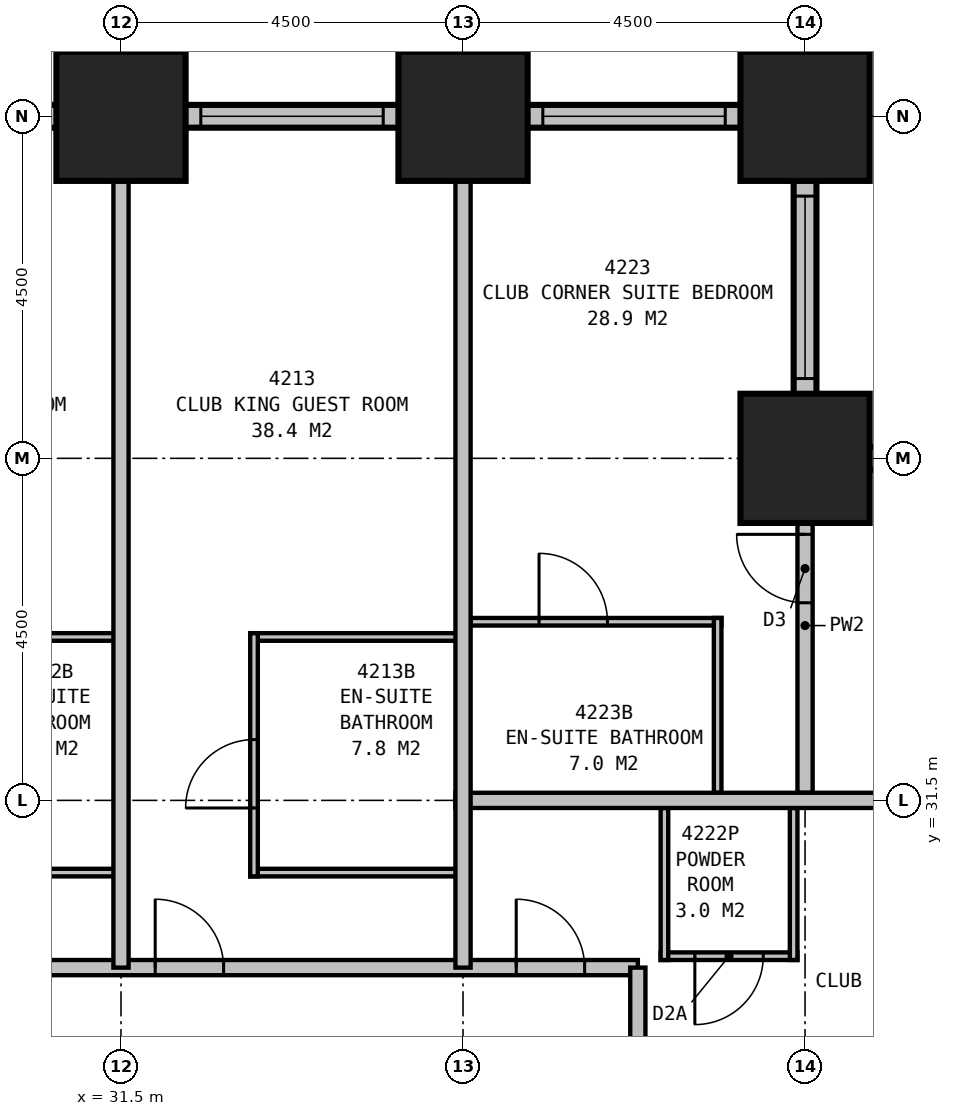
"""IFC4 building model, lengths in metres.
Left out: names, types, materials, properties, quantities, classifications, styles, units other than length and angle.
Written with IfcOpenShell. Run it as: python <this file> out.ifc"""

import sys

from ifc_helpers import new_model, si_unit, direction, frame, frame_2d, origin, origin_2d, place, context, subcontext, project, spatial, rectangle, extrude, element, fill, save


model = new_model("IFC4")
c1 = context("Model", 3, precision=1e-05, world=origin(), true_north=direction((0.0, 1.0)))
c2 = subcontext(c1, "Body", "Model", "MODEL_VIEW")
j1 = project(units=[si_unit("LENGTHUNIT", "METRE"), si_unit("PLANEANGLEUNIT", "RADIAN")], contexts=[c1])
p1 = place(None, origin())
s1 = spatial("IfcSite", under=j1, at=p1, CompositionType="ELEMENT")
p2 = place(p1, origin())
s2 = spatial("IfcBuilding", under=s1, at=p2, CompositionType="ELEMENT")
p3 = place(p2, frame((0.0, 0.0, 165.9)))
s3 = spatial("IfcBuildingStorey", under=s2, at=p3, CompositionType="ELEMENT", Elevation=165.9)
for number, where, z_axis, x_axis in (
    (1, (40.5, 36.0, 0.0), (0.0, 0.0, 1.0), (1.0, 0.0, 0.0)),
    (2, (40.5, 40.5, 0.0), (0.0, 0.0, 1.0), (1.0, 0.0, 0.0)),
    (3, (36.0, 40.5, 0.0), (0.0, 0.0, 1.0), (1.0, 0.0, 0.0)),
    (4, (31.5, 40.5, 0.0), (0.0, 0.0, 1.0), (1.0, 0.0, 0.0)),
):
    element("IfcColumn", number, at=place(p3, frame(where, z_axis=z_axis, x_axis=x_axis)), inside=s3, PredefinedType="COLUMN", context=c2, shape_type="SweptSolid", body=[
        extrude(rectangle(XDim=1.7, YDim=1.7, at=origin_2d()), origin(), (0.0, 0.0, 1.0), 3.5),
    ])
p4 = place(p3, frame((45.65, 36.0, 0.0), z_axis=(0.0, 0.0, 1.0), x_axis=(-1.0, 0.0, 0.0)))
e5 = element("IfcWall", 5, at=p4, inside=s3, PredefinedType="STANDARD", context=c2, shape_type="SweptSolid", body=[
    extrude(rectangle(XDim=5.3, YDim=0.3, at=frame_2d((2.65, 0.0))), origin(), (0.0, 0.0, 1.0), 2.25),
])
p5 = place(p4, frame((1.45, 0.0, 0.5)))
e6 = element("IfcOpeningElement", 6, at=p5, cuts=e5, PredefinedType="OPENING", context=c2, shape_type="SweptSolid", body=[
    extrude(rectangle(XDim=2.4, YDim=1.6, at=frame_2d((1.2, 0.8))), frame((0.0, 0.16, 0.0), z_axis=(0.0, -1.0, 0.0), x_axis=(1.0, 0.0, 0.0)), (0.0, 0.0, 1.0), 0.32),
])
p6 = place(p3, frame((40.5, 35.85, 0.0), z_axis=(0.0, 0.0, 1.0), x_axis=(0.0, 1.0, 0.0)))
e7 = element("IfcWall", 7, at=p6, inside=s3, PredefinedType="STANDARD", context=c2, shape_type="SweptSolid", body=[
    extrude(rectangle(XDim=4.8, YDim=0.3, at=frame_2d((2.4, 0.0))), origin(), (0.0, 0.0, 1.0), 2.25),
])
p7 = place(p6, frame((1.2, 0.0, 0.5)))
e8 = element("IfcOpeningElement", 8, at=p7, cuts=e7, PredefinedType="OPENING", context=c2, shape_type="SweptSolid", body=[
    extrude(rectangle(XDim=2.4, YDim=1.6, at=frame_2d((1.2, 0.8))), frame((0.0, 0.16, 0.0), z_axis=(0.0, -1.0, 0.0), x_axis=(1.0, 0.0, 0.0)), (0.0, 0.0, 1.0), 0.32),
])
p8 = place(p3, frame((40.65, 40.5, 0.0), z_axis=(0.0, 0.0, 1.0), x_axis=(-1.0, 0.0, 0.0)))
e9 = element("IfcWall", 9, at=p8, inside=s3, PredefinedType="STANDARD", context=c2, shape_type="SweptSolid", body=[
    extrude(rectangle(XDim=31.8, YDim=0.3, at=frame_2d((15.9, 0.0))), origin(), (0.0, 0.0, 1.0), 2.25),
])
p9 = place(p8, frame((1.2, 0.0, 0.5)))
e10 = element("IfcOpeningElement", 10, at=p9, cuts=e9, PredefinedType="OPENING", context=c2, shape_type="SweptSolid", body=[
    extrude(rectangle(XDim=2.4, YDim=1.6, at=frame_2d((1.2, 0.8))), frame((0.0, 0.16, 0.0), z_axis=(0.0, -1.0, 0.0), x_axis=(1.0, 0.0, 0.0)), (0.0, 0.0, 1.0), 0.32),
])
p10 = place(p8, frame((5.7, 0.0, 0.5)))
e11 = element("IfcOpeningElement", 11, at=p10, cuts=e9, PredefinedType="OPENING", context=c2, shape_type="SweptSolid", body=[
    extrude(rectangle(XDim=2.4, YDim=1.6, at=frame_2d((1.2, 0.8))), frame((0.0, 0.16, 0.0), z_axis=(0.0, -1.0, 0.0), x_axis=(1.0, 0.0, 0.0)), (0.0, 0.0, 1.0), 0.32),
])
p11 = place(p8, frame((10.2, 0.0, 0.5)))
e12 = element("IfcOpeningElement", 12, at=p11, cuts=e9, PredefinedType="OPENING", context=c2, shape_type="SweptSolid", body=[
    extrude(rectangle(XDim=2.4, YDim=1.6, at=frame_2d((1.2, 0.8))), frame((0.0, 0.16, 0.0), z_axis=(0.0, -1.0, 0.0), x_axis=(1.0, 0.0, 0.0)), (0.0, 0.0, 1.0), 0.32),
])
p12 = place(p8, frame((14.7, 0.0, 0.5)))
e13 = element("IfcOpeningElement", 13, at=p12, cuts=e9, PredefinedType="OPENING", context=c2, shape_type="SweptSolid", body=[
    extrude(rectangle(XDim=2.4, YDim=1.6, at=frame_2d((1.2, 0.8))), frame((0.0, 0.16, 0.0), z_axis=(0.0, -1.0, 0.0), x_axis=(1.0, 0.0, 0.0)), (0.0, 0.0, 1.0), 0.32),
])
p13 = place(p8, frame((19.2, 0.0, 0.5)))
e14 = element("IfcOpeningElement", 14, at=p13, cuts=e9, PredefinedType="OPENING", context=c2, shape_type="SweptSolid", body=[
    extrude(rectangle(XDim=2.4, YDim=1.6, at=frame_2d((1.2, 0.8))), frame((0.0, 0.16, 0.0), z_axis=(0.0, -1.0, 0.0), x_axis=(1.0, 0.0, 0.0)), (0.0, 0.0, 1.0), 0.32),
])
p14 = place(p8, frame((23.7, 0.0, 0.5)))
e15 = element("IfcOpeningElement", 15, at=p14, cuts=e9, PredefinedType="OPENING", context=c2, shape_type="SweptSolid", body=[
    extrude(rectangle(XDim=2.4, YDim=1.6, at=frame_2d((1.2, 0.8))), frame((0.0, 0.16, 0.0), z_axis=(0.0, -1.0, 0.0), x_axis=(1.0, 0.0, 0.0)), (0.0, 0.0, 1.0), 0.32),
])
p15 = place(p8, frame((28.2, 0.0, 0.5)))
e16 = element("IfcOpeningElement", 16, at=p15, cuts=e9, PredefinedType="OPENING", context=c2, shape_type="SweptSolid", body=[
    extrude(rectangle(XDim=2.4, YDim=1.6, at=frame_2d((1.2, 0.8))), frame((0.0, 0.16, 0.0), z_axis=(0.0, -1.0, 0.0), x_axis=(1.0, 0.0, 0.0)), (0.0, 0.0, 1.0), 0.32),
])
p16 = place(p3, frame((11.2, 29.3, 0.0), z_axis=(0.0, 0.0, 1.0), x_axis=(1.0, 0.0, 0.0)))
e17 = element("IfcWall", 17, at=p16, inside=s3, PredefinedType="PARTITIONING", context=c2, shape_type="SweptSolid", body=[
    extrude(rectangle(XDim=27.1, YDim=0.2, at=frame_2d((13.55, 0.0))), origin(), (0.0, 0.0, 1.0), 3.25),
])
p17 = place(p16, frame((2.75, 0.0, 0.0)))
e18 = element("IfcOpeningElement", 18, at=p17, cuts=e17, PredefinedType="OPENING", context=c2, shape_type="SweptSolid", body=[
    extrude(rectangle(XDim=0.9, YDim=2.1, at=frame_2d((0.45, 1.05))), frame((0.0, 0.11, 0.0), z_axis=(0.0, -1.0, 0.0), x_axis=(1.0, 0.0, 0.0)), (0.0, 0.0, 1.0), 0.22),
])
p18 = place(p16, frame((9.55, 0.0, 0.0)))
e19 = element("IfcOpeningElement", 19, at=p18, cuts=e17, PredefinedType="OPENING", context=c2, shape_type="SweptSolid", body=[
    extrude(rectangle(XDim=0.9, YDim=2.1, at=frame_2d((0.45, 1.05))), frame((0.0, 0.11, 0.0), z_axis=(0.0, -1.0, 0.0), x_axis=(1.0, 0.0, 0.0)), (0.0, 0.0, 1.0), 0.22),
])
p19 = place(p16, frame((16.25, 0.0, 0.0)))
e20 = element("IfcOpeningElement", 20, at=p19, cuts=e17, PredefinedType="OPENING", context=c2, shape_type="SweptSolid", body=[
    extrude(rectangle(XDim=0.9, YDim=2.1, at=frame_2d((0.45, 1.05))), frame((0.0, 0.11, 0.0), z_axis=(0.0, -1.0, 0.0), x_axis=(1.0, 0.0, 0.0)), (0.0, 0.0, 1.0), 0.22),
])
p20 = place(p16, frame((20.75, 0.0, 0.0)))
e21 = element("IfcOpeningElement", 21, at=p20, cuts=e17, PredefinedType="OPENING", context=c2, shape_type="SweptSolid", body=[
    extrude(rectangle(XDim=0.9, YDim=2.1, at=frame_2d((0.45, 1.05))), frame((0.0, 0.11, 0.0), z_axis=(0.0, -1.0, 0.0), x_axis=(1.0, 0.0, 0.0)), (0.0, 0.0, 1.0), 0.22),
])
p21 = place(p16, frame((25.5, 0.0, 0.0)))
e22 = element("IfcOpeningElement", 22, at=p21, cuts=e17, PredefinedType="OPENING", context=c2, shape_type="SweptSolid", body=[
    extrude(rectangle(XDim=0.9, YDim=2.1, at=frame_2d((0.45, 1.05))), frame((0.0, 0.11, 0.0), z_axis=(0.0, -1.0, 0.0), x_axis=(1.0, 0.0, 0.0)), (0.0, 0.0, 1.0), 0.22),
])
p22 = place(p16, frame((0.7, 0.0, 0.0)))
e23 = element("IfcOpeningElement", 23, at=p22, cuts=e17, PredefinedType="OPENING", context=c2, shape_type="SweptSolid", body=[
    extrude(rectangle(XDim=0.9, YDim=2.1, at=frame_2d((0.45, 1.05))), frame((0.0, 0.11, 0.0), z_axis=(0.0, -1.0, 0.0), x_axis=(1.0, 0.0, 0.0)), (0.0, 0.0, 1.0), 0.22),
])
p23 = place(p3, frame((38.3, 10.6, 0.0), z_axis=(0.0, 0.0, 1.0), x_axis=(0.0, 1.0, 0.0)))
e24 = element("IfcWall", 24, at=p23, inside=s3, PredefinedType="PARTITIONING", context=c2, shape_type="SweptSolid", body=[
    extrude(rectangle(XDim=18.7, YDim=0.2, at=frame_2d((9.35, 0.0))), origin(), (0.0, 0.0, 1.0), 3.25),
])
p24 = place(p23, frame((6.95, 0.0, 0.0), z_axis=(0.0, 0.0, 1.0), x_axis=(-1.0, 0.0, 0.0)))
e25 = element("IfcOpeningElement", 25, at=p24, cuts=e24, PredefinedType="OPENING", context=c2, shape_type="SweptSolid", body=[
    extrude(rectangle(XDim=0.9, YDim=2.1, at=frame_2d((0.45, 1.05))), frame((0.0, 0.11, 0.0), z_axis=(0.0, -1.0, 0.0), x_axis=(1.0, 0.0, 0.0)), (0.0, 0.0, 1.0), 0.22),
])
p25 = place(p23, frame((11.05, 0.0, 0.0), z_axis=(0.0, 0.0, 1.0), x_axis=(-1.0, 0.0, 0.0)))
e26 = element("IfcOpeningElement", 26, at=p25, cuts=e24, PredefinedType="OPENING", context=c2, shape_type="SweptSolid", body=[
    extrude(rectangle(XDim=0.9, YDim=2.1, at=frame_2d((0.45, 1.05))), frame((0.0, 0.11, 0.0), z_axis=(0.0, -1.0, 0.0), x_axis=(1.0, 0.0, 0.0)), (0.0, 0.0, 1.0), 0.22),
])
p26 = place(p3, frame((31.5, 29.3, 0.0), z_axis=(0.0, 0.0, 1.0), x_axis=(0.0, 1.0, 0.0)))
e27 = element("IfcWall", 27, at=p26, inside=s3, PredefinedType="PARTITIONING", context=c2, shape_type="SweptSolid", body=[
    extrude(rectangle(XDim=11.2, YDim=0.2, at=frame_2d((5.6, 0.0))), origin(), (0.0, 0.0, 1.0), 2.25),
])
for number, where, z_axis, x_axis in (
    (28, (28.7, 30.55, 0.0), (0.0, 0.0, 1.0), (1.0, 0.0, 0.0)),
    (29, (28.7, 33.65, 0.0), (0.0, 0.0, 1.0), (1.0, 0.0, 0.0)),
    (30, (33.2, 30.55, 0.0), (0.0, 0.0, 1.0), (1.0, 0.0, 0.0)),
    (31, (33.2, 33.65, 0.0), (0.0, 0.0, 1.0), (1.0, 0.0, 0.0)),
):
    element("IfcWall", number, at=place(p3, frame(where, z_axis=z_axis, x_axis=x_axis)), inside=s3, PredefinedType="PLUMBINGWALL", context=c2, shape_type="SweptSolid", body=[
        extrude(rectangle(XDim=2.8, YDim=0.1, at=frame_2d((1.4, 0.0))), origin(), (0.0, 0.0, 1.0), 3.25),
    ])
p27 = place(p3, frame((33.25, 30.5, 0.0), z_axis=(0.0, 0.0, 1.0), x_axis=(0.0, 1.0, 0.0)))
e32 = element("IfcWall", 32, at=p27, inside=s3, PredefinedType="PLUMBINGWALL", context=c2, shape_type="SweptSolid", body=[
    extrude(rectangle(XDim=3.2, YDim=0.1, at=frame_2d((1.6, 0.0))), origin(), (0.0, 0.0, 1.0), 3.25),
])
p28 = place(p27, frame((0.9, 0.0, 0.0)))
e33 = element("IfcOpeningElement", 33, at=p28, cuts=e32, PredefinedType="OPENING", context=c2, shape_type="SweptSolid", body=[
    extrude(rectangle(XDim=0.9, YDim=2.1, at=frame_2d((0.45, 1.05))), frame((0.0, 0.06, 0.0), z_axis=(0.0, -1.0, 0.0), x_axis=(1.0, 0.0, 0.0)), (0.0, 0.0, 1.0), 0.12),
])
p29 = place(p3, frame((36.0, 29.3, 0.0), z_axis=(0.0, 0.0, 1.0), x_axis=(0.0, 1.0, 0.0)))
e34 = element("IfcWall", 34, at=p29, inside=s3, PredefinedType="PARTITIONING", context=c2, shape_type="SweptSolid", body=[
    extrude(rectangle(XDim=11.2, YDim=0.2, at=frame_2d((5.6, 0.0))), origin(), (0.0, 0.0, 1.0), 2.25),
])
p30 = place(p3, frame((35.9, 31.5, 0.0), z_axis=(0.0, 0.0, 1.0), x_axis=(1.0, 0.0, 0.0)))
e35 = element("IfcWall", 35, at=p30, inside=s3, PredefinedType="PARTITIONING", context=c2, shape_type="SweptSolid", body=[
    extrude(rectangle(XDim=10.099, YDim=0.2, at=frame_2d((5.05, 0.0))), origin(), (0.0, 0.0, 1.0), 3.25),
])
p31 = place(p30, frame((8.099, 0.0, 0.0)))
e36 = element("IfcOpeningElement", 36, at=p31, cuts=e35, PredefinedType="OPENING", context=c2, shape_type="SweptSolid", body=[
    extrude(rectangle(XDim=0.9, YDim=2.1, at=frame_2d((0.45, 1.05))), frame((0.0, 0.11, 0.0), z_axis=(0.0, -1.0, 0.0), x_axis=(1.0, 0.0, 0.0)), (0.0, 0.0, 1.0), 0.22),
])
p32 = place(p3, frame((40.35, 31.4, 0.0), z_axis=(0.0, 0.0, 1.0), x_axis=(0.0, -1.0, 0.0)))
e37 = element("IfcWall", 37, at=p32, inside=s3, PredefinedType="PLUMBINGWALL", context=c2, shape_type="SweptSolid", body=[
    extrude(rectangle(XDim=2.0, YDim=0.1, at=frame_2d((1.0, 0.0))), origin(), (0.0, 0.0, 1.0), 2.25),
])
p33 = place(p3, frame((38.65, 31.4, 0.0), z_axis=(0.0, 0.0, 1.0), x_axis=(0.0, -1.0, 0.0)))
e38 = element("IfcWall", 38, at=p33, inside=s3, PredefinedType="PLUMBINGWALL", context=c2, shape_type="SweptSolid", body=[
    extrude(rectangle(XDim=2.0, YDim=0.1, at=frame_2d((1.0, 0.0))), origin(), (0.0, 0.0, 1.0), 3.25),
])
p34 = place(p3, frame((38.6, 29.45, 0.0), z_axis=(0.0, 0.0, 1.0), x_axis=(1.0, 0.0, 0.0)))
e39 = element("IfcWall", 39, at=p34, inside=s3, PredefinedType="PLUMBINGWALL", context=c2, shape_type="SweptSolid", body=[
    extrude(rectangle(XDim=1.8, YDim=0.1, at=frame_2d((0.9, 0.0))), origin(), (0.0, 0.0, 1.0), 3.25),
])
p35 = place(p34, frame((1.35, 0.0, 0.0), z_axis=(0.0, 0.0, 1.0), x_axis=(-1.0, 0.0, 0.0)))
e40 = element("IfcOpeningElement", 40, at=p35, cuts=e39, PredefinedType="OPENING", context=c2, shape_type="SweptSolid", body=[
    extrude(rectangle(XDim=0.9, YDim=2.1, at=frame_2d((0.45, 1.05))), frame((0.0, 0.06, 0.0), z_axis=(0.0, -1.0, 0.0), x_axis=(1.0, 0.0, 0.0)), (0.0, 0.0, 1.0), 0.12),
])
p36 = place(p3, frame((40.5, 31.6, 0.0), z_axis=(0.0, 0.0, 1.0), x_axis=(0.0, 1.0, 0.0)))
e41 = element("IfcWall", 41, at=p36, inside=s3, PredefinedType="PARTITIONING", context=c2, shape_type="SweptSolid", body=[
    extrude(rectangle(XDim=4.4, YDim=0.2, at=frame_2d((2.2, 0.0))), origin(), (0.0, 0.0, 1.0), 2.25),
])
p37 = place(p36, frame((2.5, 0.0, 0.0)))
e42 = element("IfcOpeningElement", 42, at=p37, cuts=e41, PredefinedType="OPENING", context=c2, shape_type="SweptSolid", body=[
    extrude(rectangle(XDim=0.9, YDim=2.1, at=frame_2d((0.45, 1.05))), frame((0.0, 0.11, 0.0), z_axis=(0.0, -1.0, 0.0), x_axis=(1.0, 0.0, 0.0)), (0.0, 0.0, 1.0), 0.22),
])
p38 = place(p3, frame((39.35, 31.6, 0.0), z_axis=(0.0, 0.0, 1.0), x_axis=(0.0, 1.0, 0.0)))
e43 = element("IfcWall", 43, at=p38, inside=s3, PredefinedType="PLUMBINGWALL", context=c2, shape_type="SweptSolid", body=[
    extrude(rectangle(XDim=2.3, YDim=0.1, at=frame_2d((1.15, 0.0))), origin(), (0.0, 0.0, 1.0), 3.25),
])
p39 = place(p3, frame((36.1, 33.85, 0.0), z_axis=(0.0, 0.0, 1.0), x_axis=(1.0, 0.0, 0.0)))
e44 = element("IfcWall", 44, at=p39, inside=s3, PredefinedType="PLUMBINGWALL", context=c2, shape_type="SweptSolid", body=[
    extrude(rectangle(XDim=3.3, YDim=0.1, at=frame_2d((1.65, 0.0))), origin(), (0.0, 0.0, 1.0), 3.25),
])
p40 = place(p39, frame((0.9, 0.0, 0.0)))
e45 = element("IfcOpeningElement", 45, at=p40, cuts=e44, PredefinedType="OPENING", context=c2, shape_type="SweptSolid", body=[
    extrude(rectangle(XDim=0.9, YDim=2.1, at=frame_2d((0.45, 1.05))), frame((0.0, 0.06, 0.0), z_axis=(0.0, -1.0, 0.0), x_axis=(1.0, 0.0, 0.0)), (0.0, 0.0, 1.0), 0.12),
])
p41 = place(p7, origin())
e46 = element("IfcWindow", 46, at=p41, inside=s3, PartitioningType="SINGLE_PANEL", PredefinedType="WINDOW", context=c2, shape_type="SweptSolid", body=[
    extrude(rectangle(XDim=2.4, YDim=1.6, at=frame_2d((1.2, 0.8))), frame((0.0, 0.03, 0.0), z_axis=(0.0, -1.0, 0.0), x_axis=(1.0, 0.0, 0.0)), (0.0, 0.0, 1.0), 0.06),
])
fill(e8, e46)
p42 = place(p9, origin())
e47 = element("IfcWindow", 47, at=p42, inside=s3, PartitioningType="SINGLE_PANEL", PredefinedType="WINDOW", context=c2, shape_type="SweptSolid", body=[
    extrude(rectangle(XDim=2.4, YDim=1.6, at=frame_2d((1.2, 0.8))), frame((0.0, 0.03, 0.0), z_axis=(0.0, -1.0, 0.0), x_axis=(1.0, 0.0, 0.0)), (0.0, 0.0, 1.0), 0.06),
])
fill(e10, e47)
p43 = place(p10, origin())
e48 = element("IfcWindow", 48, at=p43, inside=s3, PartitioningType="SINGLE_PANEL", PredefinedType="WINDOW", context=c2, shape_type="SweptSolid", body=[
    extrude(rectangle(XDim=2.4, YDim=1.6, at=frame_2d((1.2, 0.8))), frame((0.0, 0.03, 0.0), z_axis=(0.0, -1.0, 0.0), x_axis=(1.0, 0.0, 0.0)), (0.0, 0.0, 1.0), 0.06),
])
fill(e11, e48)
p44 = place(p20, origin())
e49 = element("IfcDoor", 49, at=p44, inside=s3, OperationType="SINGLE_SWING_LEFT", PredefinedType="DOOR", context=c2, shape_type="SweptSolid", body=[
    extrude(rectangle(XDim=0.9, YDim=2.1, at=frame_2d((0.45, 1.05))), frame((0.0, 0.025, 0.0), z_axis=(0.0, -1.0, 0.0), x_axis=(1.0, 0.0, 0.0)), (0.0, 0.0, 1.0), 0.05),
])
fill(e21, e49)
p45 = place(p21, origin())
e50 = element("IfcDoor", 50, at=p45, inside=s3, OperationType="SINGLE_SWING_LEFT", PredefinedType="DOOR", context=c2, shape_type="SweptSolid", body=[
    extrude(rectangle(XDim=0.9, YDim=2.1, at=frame_2d((0.45, 1.05))), frame((0.0, 0.025, 0.0), z_axis=(0.0, -1.0, 0.0), x_axis=(1.0, 0.0, 0.0)), (0.0, 0.0, 1.0), 0.05),
])
fill(e22, e50)
p46 = place(p28, origin())
e51 = element("IfcDoor", 51, at=p46, inside=s3, OperationType="SINGLE_SWING_LEFT", PredefinedType="DOOR", context=c2, shape_type="SweptSolid", body=[
    extrude(rectangle(XDim=0.9, YDim=2.1, at=frame_2d((0.45, 1.05))), frame((0.0, 0.025, 0.0), z_axis=(0.0, -1.0, 0.0), x_axis=(1.0, 0.0, 0.0)), (0.0, 0.0, 1.0), 0.05),
])
fill(e33, e51)
p47 = place(p35, origin())
e52 = element("IfcDoor", 52, at=p47, inside=s3, OperationType="SINGLE_SWING_RIGHT", PredefinedType="DOOR", context=c2, shape_type="SweptSolid", body=[
    extrude(rectangle(XDim=0.9, YDim=2.1, at=frame_2d((0.45, 1.05))), frame((0.0, 0.025, 0.0), z_axis=(0.0, -1.0, 0.0), x_axis=(1.0, 0.0, 0.0)), (0.0, 0.0, 1.0), 0.05),
])
fill(e40, e52)
p48 = place(p37, origin())
e53 = element("IfcDoor", 53, at=p48, inside=s3, OperationType="SINGLE_SWING_RIGHT", PredefinedType="DOOR", context=c2, shape_type="SweptSolid", body=[
    extrude(rectangle(XDim=0.9, YDim=2.1, at=frame_2d((0.45, 1.05))), frame((0.0, 0.025, 0.0), z_axis=(0.0, -1.0, 0.0), x_axis=(1.0, 0.0, 0.0)), (0.0, 0.0, 1.0), 0.05),
])
fill(e42, e53)
p49 = place(p40, origin())
e54 = element("IfcDoor", 54, at=p49, inside=s3, OperationType="SINGLE_SWING_LEFT", PredefinedType="DOOR", context=c2, shape_type="SweptSolid", body=[
    extrude(rectangle(XDim=0.9, YDim=2.1, at=frame_2d((0.45, 1.05))), frame((0.0, 0.025, 0.0), z_axis=(0.0, -1.0, 0.0), x_axis=(1.0, 0.0, 0.0)), (0.0, 0.0, 1.0), 0.05),
])
fill(e45, e54)
save(model, sys.argv[1])
